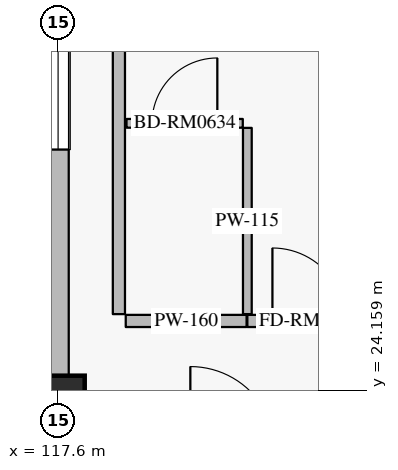
"""IFC4 building model, lengths in metres.
Left out: names, types, materials, properties, quantities, classifications, styles, units other than length and angle.
Written with IfcOpenShell. Run it as: python <this file> out.ifc"""

import sys

from ifc_helpers import new_model, si_unit, direction, frame, frame_2d, origin, origin_2d, place, context, subcontext, project, spatial, rectangle, extrude, element, fill, save


model = new_model("IFC4")
c1 = context("Model", 3, precision=1e-05, world=origin(), true_north=direction((0.0, 1.0)))
c2 = subcontext(c1, "Body", "Model", "MODEL_VIEW")
j1 = project(units=[si_unit("LENGTHUNIT", "METRE"), si_unit("PLANEANGLEUNIT", "RADIAN")], contexts=[c1])
p1 = place(None, origin())
s1 = spatial("IfcSite", under=j1, at=p1, CompositionType="ELEMENT")
p2 = place(p1, origin())
s2 = spatial("IfcBuilding", under=s1, at=p2, CompositionType="ELEMENT")
p3 = place(p2, frame((0.0, 0.0, 25.2)))
s3 = spatial("IfcBuildingStorey", under=s2, at=p3, CompositionType="ELEMENT", Elevation=25.2)
p4 = place(p3, frame((117.6, 24.0, 0.0), z_axis=(0.0, 0.0, 1.0), x_axis=(1.0, 0.0, 0.0)))
e1 = element("IfcColumn", 1, at=p4, inside=s3, PredefinedType="COLUMN", context=c2, shape_type="SweptSolid", body=[
    extrude(rectangle(XDim=0.7, YDim=0.7, at=origin_2d()), origin(), (0.0, 0.0, 1.0), 3.6),
])
p5 = place(p3, frame((117.6, 24.35, 0.0), z_axis=(0.0, 0.0, 1.0), x_axis=(0.0, 1.0, 0.0)))
e2 = element("IfcWall", 2, at=p5, inside=s3, PredefinedType="SOLIDWALL", context=c2, shape_type="SweptSolid", body=[
    extrude(rectangle(XDim=7.25, YDim=0.28, at=frame_2d((3.625, 0.0))), origin(), (0.0, 0.0, 1.0), 2.7),
])
p6 = place(p5, frame((2.975, 0.0, 0.5)))
e3 = element("IfcOpeningElement", 3, at=p6, cuts=e2, PredefinedType="OPENING", context=c2, shape_type="SweptSolid", body=[
    extrude(rectangle(XDim=1.3, YDim=1.65, at=frame_2d((0.65, 0.825))), frame((0.0, 0.15, 0.0), z_axis=(0.0, -1.0, 0.0), x_axis=(1.0, 0.0, 0.0)), (0.0, 0.0, 1.0), 0.3),
])
p7 = place(p3, frame((118.49, 25.07, 0.0), z_axis=(0.0, 0.0, 1.0), x_axis=(1.0, 0.0, 0.0)))
e4 = element("IfcWall", 4, at=p7, inside=s3, PredefinedType="PARTITIONING", context=c2, shape_type="SweptSolid", body=[
    extrude(rectangle(XDim=1.59, YDim=0.16, at=frame_2d((0.795, 0.0))), origin(), (0.0, 0.0, 1.0), 3.335),
])
p8 = place(p3, frame((120.09, 25.07, 0.0), z_axis=(0.0, 0.0, 1.0), x_axis=(1.0, 0.0, 0.0)))
e5 = element("IfcWall", 5, at=p8, inside=s3, PredefinedType="PARTITIONING", context=c2, shape_type="SweptSolid", body=[
    extrude(rectangle(XDim=1.62, YDim=0.16, at=frame_2d((0.81, 0.0))), origin(), (0.0, 0.0, 1.0), 3.335),
])
p9 = place(p8, frame((0.33, 0.0, 0.0)))
e6 = element("IfcOpeningElement", 6, at=p9, cuts=e5, PredefinedType="OPENING", context=c2, shape_type="SweptSolid", body=[
    extrude(rectangle(XDim=0.96, YDim=2.2, at=frame_2d((0.48, 1.1))), frame((0.0, 0.09, 0.0), z_axis=(0.0, -1.0, 0.0), x_axis=(1.0, 0.0, 0.0)), (0.0, 0.0, 1.0), 0.18),
])
p10 = place(p3, frame((120.09, 25.16, 0.0), z_axis=(0.0, 0.0, 1.0), x_axis=(0.0, 1.0, 0.0)))
e7 = element("IfcWall", 7, at=p10, inside=s3, PredefinedType="PARTITIONING", context=c2, shape_type="SweptSolid", body=[
    extrude(rectangle(XDim=2.45, YDim=0.115, at=frame_2d((1.225, 0.0))), origin(), (0.0, 0.0, 1.0), 3.335),
])
p11 = place(p3, frame((118.5, 27.67, 0.0), z_axis=(0.0, 0.0, 1.0), x_axis=(1.0, 0.0, 0.0)))
e8 = element("IfcWall", 8, at=p11, inside=s3, PredefinedType="PARTITIONING", context=c2, shape_type="SweptSolid", body=[
    extrude(rectangle(XDim=1.53, YDim=0.115, at=frame_2d((0.765, 0.0))), origin(), (0.0, 0.0, 1.0), 3.335),
])
p12 = place(p11, frame((0.335, 0.0, 0.0)))
e9 = element("IfcOpeningElement", 9, at=p12, cuts=e8, PredefinedType="OPENING", context=c2, shape_type="SweptSolid", body=[
    extrude(rectangle(XDim=0.86, YDim=2.12, at=frame_2d((0.43, 1.06))), frame((0.0, 0.067, 0.0), z_axis=(0.0, -1.0, 0.0), x_axis=(1.0, 0.0, 0.0)), (0.0, 0.0, 1.0), 0.135),
])
p13 = place(p3, frame((118.4, 25.16, 0.0), z_axis=(0.0, 0.0, 1.0), x_axis=(0.0, 1.0, 0.0)))
e10 = element("IfcWall", 10, at=p13, inside=s3, PredefinedType="PARTITIONING", context=c2, shape_type="SweptSolid", body=[
    extrude(rectangle(XDim=6.5, YDim=0.16, at=frame_2d((3.25, 0.0))), origin(), (0.0, 0.0, 1.0), 3.335),
])
p14 = place(p6, origin())
e11 = element("IfcWindow", 11, at=p14, inside=s3, PartitioningType="SINGLE_PANEL", PredefinedType="WINDOW", context=c2, shape_type="SweptSolid", body=[
    extrude(rectangle(XDim=1.3, YDim=1.65, at=frame_2d((0.65, 0.825))), frame((0.0, 0.03, 0.0), z_axis=(0.0, -1.0, 0.0), x_axis=(1.0, 0.0, 0.0)), (0.0, 0.0, 1.0), 0.06),
])
fill(e3, e11)
p15 = place(p9, origin())
e12 = element("IfcDoor", 12, at=p15, inside=s3, OperationType="SINGLE_SWING_LEFT", PredefinedType="DOOR", context=c2, shape_type="SweptSolid", body=[
    extrude(rectangle(XDim=0.96, YDim=2.2, at=frame_2d((0.48, 1.1))), frame((0.0, 0.025, 0.0), z_axis=(0.0, -1.0, 0.0), x_axis=(1.0, 0.0, 0.0)), (0.0, 0.0, 1.0), 0.05),
])
fill(e6, e12)
p16 = place(p12, origin())
e13 = element("IfcDoor", 13, at=p16, inside=s3, OperationType="SINGLE_SWING_RIGHT", PredefinedType="DOOR", context=c2, shape_type="SweptSolid", body=[
    extrude(rectangle(XDim=0.86, YDim=2.12, at=frame_2d((0.43, 1.06))), frame((0.0, 0.025, 0.0), z_axis=(0.0, -1.0, 0.0), x_axis=(1.0, 0.0, 0.0)), (0.0, 0.0, 1.0), 0.05),
])
fill(e9, e13)
save(model, sys.argv[1])
